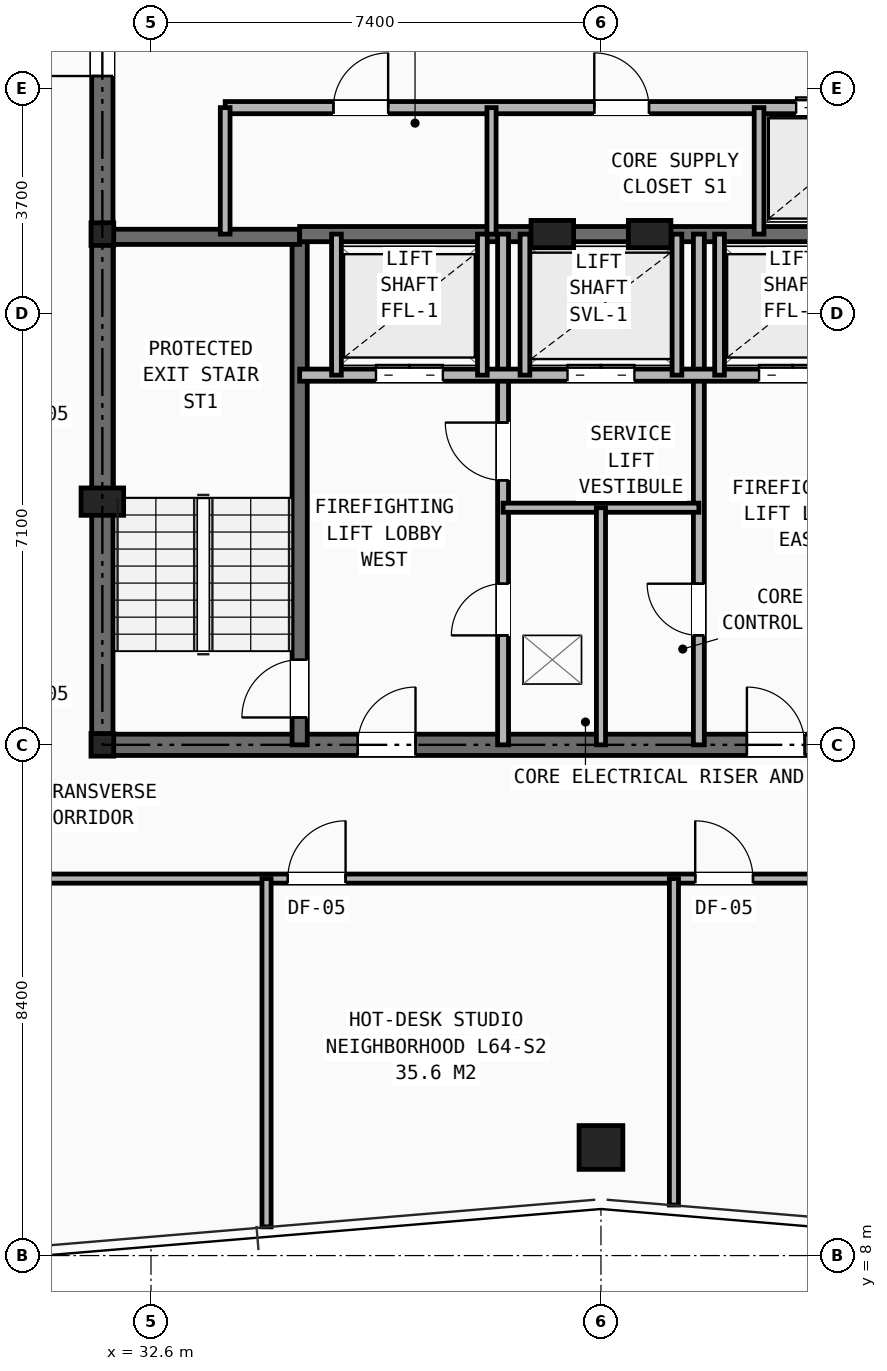
"""IFC4 building model, lengths in metres.
Left out: names, types, materials, properties, quantities, classifications, styles, units other than length and angle.
Written with IfcOpenShell. Run it as: python <this file> out.ifc"""

import sys

from ifc_helpers import new_model, si_unit, direction, frame, frame_2d, origin, origin_2d, place, context, subcontext, project, spatial, rectangle, hollow_rectangle, i_section, extrude, element, fill, save


model = new_model("IFC4")
c1 = context("Model", 3, precision=1e-05, world=origin(), true_north=direction((0.0, 1.0)))
c2 = subcontext(c1, "Body", "Model", "MODEL_VIEW")
j1 = project(units=[si_unit("LENGTHUNIT", "METRE"), si_unit("PLANEANGLEUNIT", "RADIAN")], contexts=[c1])
p1 = place(None, origin())
s1 = spatial("IfcSite", under=j1, at=p1, CompositionType="ELEMENT")
p2 = place(p1, origin())
s2 = spatial("IfcBuilding", under=s1, at=p2, CompositionType="ELEMENT")
p3 = place(p2, frame((0.0, 0.0, 225.9)))
s3 = spatial("IfcBuildingStorey", under=s2, at=p3, CompositionType="ELEMENT", Elevation=225.9)
for number, where, z_axis, x_axis in (
    (1, (31.8, 16.4, 0.0), (0.0, 0.0, 1.0), (1.0, 0.0, 0.0)),
    (2, (31.8, 24.8, 0.0), (0.0, 0.0, 1.0), (1.0, 0.0, 0.0)),
):
    element("IfcColumn", number, at=place(p3, frame(where, z_axis=z_axis, x_axis=x_axis)), inside=s3, PredefinedType="COLUMN", context=c2, shape_type="SweptSolid", body=[
        extrude(i_section(OverallWidth=0.374, OverallDepth=0.372, WebThickness=0.016, FlangeThickness=0.026, at=origin_2d()), origin(), (0.0, 0.0, 1.0), 3.5),
    ])
for number, where, z_axis, x_axis in (
    (3, (31.8, 20.4, 0.0), (0.0, 0.0, 1.0), (1.0, 0.0, 0.0)),
    (4, (39.2, 24.8, 0.0), (0.0, 0.0, 1.0), (1.0, 0.0, 0.0)),
    (5, (40.8, 24.8, 0.0), (0.0, 0.0, 1.0), (1.0, 0.0, 0.0)),
):
    element("IfcColumn", number, at=place(p3, frame(where, z_axis=z_axis, x_axis=x_axis)), inside=s3, PredefinedType="PILASTER", context=c2, shape_type="SweptSolid", body=[
        extrude(rectangle(XDim=0.7, YDim=0.45, at=origin_2d()), origin(), (0.0, 0.0, 1.0), 3.5),
    ])
p4 = place(p3, frame((40.0, 9.778, 0.0), z_axis=(0.0, 0.0, 1.0), x_axis=(1.0, 0.0, 0.0)))
e6 = element("IfcColumn", 6, at=p4, inside=s3, PredefinedType="COLUMN", context=c2, shape_type="SweptSolid", body=[
    extrude(hollow_rectangle(XDim=0.72, YDim=0.72, WallThickness=0.05, at=origin_2d()), origin(), (0.0, 0.0, 1.0), 3.5),
])
p5 = place(p3, frame((31.8, 16.4, 0.0), z_axis=(0.0, 0.0, 1.0), x_axis=(1.0, 0.0, 0.0)))
e7 = element("IfcWall", 7, at=p5, inside=s3, PredefinedType="SHEAR", context=c2, shape_type="SweptSolid", body=[
    extrude(rectangle(XDim=16.4, YDim=0.35, at=frame_2d((8.2, 0.0))), origin(), (0.0, 0.0, 1.0), 3.25),
])
p6 = place(p5, frame((4.2, 0.0, 0.0)))
e8 = element("IfcOpeningElement", 8, at=p6, cuts=e7, PredefinedType="OPENING", context=c2, shape_type="SweptSolid", body=[
    extrude(rectangle(XDim=0.95, YDim=2.1, at=frame_2d((0.475, 1.05))), frame((0.0, 0.185, 0.0), z_axis=(0.0, -1.0, 0.0), x_axis=(1.0, 0.0, 0.0)), (0.0, 0.0, 1.0), 0.37),
])
p7 = place(p5, frame((10.6, 0.0, 0.0)))
e9 = element("IfcOpeningElement", 9, at=p7, cuts=e7, PredefinedType="OPENING", context=c2, shape_type="SweptSolid", body=[
    extrude(rectangle(XDim=0.95, YDim=2.1, at=frame_2d((0.475, 1.05))), frame((0.0, 0.185, 0.0), z_axis=(0.0, -1.0, 0.0), x_axis=(1.0, 0.0, 0.0)), (0.0, 0.0, 1.0), 0.37),
])
p8 = place(p3, frame((31.8, 16.4, 0.0), z_axis=(0.0, 0.0, 1.0), x_axis=(0.0, 1.0, 0.0)))
e10 = element("IfcWall", 10, at=p8, inside=s3, PredefinedType="SHEAR", context=c2, shape_type="SweptSolid", body=[
    extrude(rectangle(XDim=14.8, YDim=0.35, at=frame_2d((7.4, 0.0))), origin(), (0.0, 0.0, 1.0), 3.25),
])
p9 = place(p8, frame((11.0, 0.0, 0.0)))
e11 = element("IfcOpeningElement", 11, at=p9, cuts=e10, PredefinedType="OPENING", context=c2, shape_type="SweptSolid", body=[
    extrude(rectangle(XDim=1.1, YDim=2.15, at=frame_2d((0.55, 1.075))), frame((0.0, 0.185, 0.0), z_axis=(0.0, -1.0, 0.0), x_axis=(1.0, 0.0, 0.0)), (0.0, 0.0, 1.0), 0.37),
])
p10 = place(p3, frame((35.045, 16.4, 0.0), z_axis=(0.0, 0.0, 1.0), x_axis=(0.0, 1.0, 0.0)))
e12 = element("IfcWall", 12, at=p10, inside=s3, PredefinedType="SHEAR", context=c2, shape_type="SweptSolid", body=[
    extrude(rectangle(XDim=8.4, YDim=0.25, at=frame_2d((4.2, 0.0))), origin(), (0.0, 0.0, 1.0), 3.25),
])
p11 = place(p10, frame((0.45, 0.0, 0.0)))
e13 = element("IfcOpeningElement", 13, at=p11, cuts=e12, PredefinedType="OPENING", context=c2, shape_type="SweptSolid", body=[
    extrude(rectangle(XDim=0.95, YDim=2.1, at=frame_2d((0.475, 1.05))), frame((0.0, 0.135, 0.0), z_axis=(0.0, -1.0, 0.0), x_axis=(1.0, 0.0, 0.0)), (0.0, 0.0, 1.0), 0.27),
])
p12 = place(p3, frame((31.8, 24.755, 0.0), z_axis=(0.0, 0.0, 1.0), x_axis=(1.0, 0.0, 0.0)))
e14 = element("IfcWall", 14, at=p12, inside=s3, PredefinedType="SHEAR", context=c2, shape_type="SweptSolid", body=[
    extrude(rectangle(XDim=3.245, YDim=0.25, at=frame_2d((1.623, 0.0))), origin(), (0.0, 0.0, 1.0), 3.25),
])
p13 = place(p3, frame((35.045, 24.8, 0.0), z_axis=(0.0, 0.0, 1.0), x_axis=(1.0, 0.0, 0.0)))
e15 = element("IfcWall", 15, at=p13, inside=s3, PredefinedType="SHEAR", context=c2, shape_type="SweptSolid", body=[
    extrude(rectangle(XDim=9.91, YDim=0.25, at=frame_2d((4.955, 0.0))), origin(), (0.0, 0.0, 1.0), 3.25),
])
p14 = place(p3, frame((38.39, 16.4, 0.0), z_axis=(0.0, 0.0, 1.0), x_axis=(0.0, 1.0, 0.0)))
e16 = element("IfcWall", 16, at=p14, inside=s3, PredefinedType="PARTITIONING", context=c2, shape_type="SweptSolid", body=[
    extrude(rectangle(XDim=8.4, YDim=0.18, at=frame_2d((4.2, 0.0))), origin(), (0.0, 0.0, 1.0), 2.705),
])
p15 = place(p14, frame((1.8, 0.0, 0.0)))
e17 = element("IfcOpeningElement", 17, at=p15, cuts=e16, PredefinedType="OPENING", context=c2, shape_type="SweptSolid", body=[
    extrude(rectangle(XDim=0.85, YDim=2.05, at=frame_2d((0.425, 1.025))), frame((0.0, 0.1, 0.0), z_axis=(0.0, -1.0, 0.0), x_axis=(1.0, 0.0, 0.0)), (0.0, 0.0, 1.0), 0.2),
])
p16 = place(p14, frame((4.35, 0.0, 0.0)))
e18 = element("IfcOpeningElement", 18, at=p16, cuts=e16, PredefinedType="OPENING", context=c2, shape_type="SweptSolid", body=[
    extrude(rectangle(XDim=0.95, YDim=2.1, at=frame_2d((0.475, 1.05))), frame((0.0, 0.1, 0.0), z_axis=(0.0, -1.0, 0.0), x_axis=(1.0, 0.0, 0.0)), (0.0, 0.0, 1.0), 0.2),
])
p17 = place(p3, frame((41.61, 16.4, 0.0), z_axis=(0.0, 0.0, 1.0), x_axis=(0.0, 1.0, 0.0)))
e19 = element("IfcWall", 19, at=p17, inside=s3, PredefinedType="PARTITIONING", context=c2, shape_type="SweptSolid", body=[
    extrude(rectangle(XDim=8.4, YDim=0.18, at=frame_2d((4.2, 0.0))), origin(), (0.0, 0.0, 1.0), 2.705),
])
p18 = place(p17, frame((1.8, 0.0, 0.0)))
e20 = element("IfcOpeningElement", 20, at=p18, cuts=e19, PredefinedType="OPENING", context=c2, shape_type="SweptSolid", body=[
    extrude(rectangle(XDim=0.85, YDim=2.05, at=frame_2d((0.425, 1.025))), frame((0.0, 0.1, 0.0), z_axis=(0.0, -1.0, 0.0), x_axis=(1.0, 0.0, 0.0)), (0.0, 0.0, 1.0), 0.2),
])
p19 = place(p3, frame((35.045, 22.48, 0.0), z_axis=(0.0, 0.0, 1.0), x_axis=(1.0, 0.0, 0.0)))
e21 = element("IfcWall", 21, at=p19, inside=s3, PredefinedType="SOLIDWALL", context=c2, shape_type="SweptSolid", body=[
    extrude(rectangle(XDim=9.91, YDim=0.2, at=frame_2d((4.955, 0.0))), origin(), (0.0, 0.0, 1.0), 3.25),
])
p20 = place(p19, frame((1.255, 0.0, 0.0)))
e22 = element("IfcOpeningElement", 22, at=p20, cuts=e21, PredefinedType="OPENING", context=c2, shape_type="SweptSolid", body=[
    extrude(rectangle(XDim=1.1, YDim=2.15, at=frame_2d((0.55, 1.075))), frame((0.0, 0.11, 0.0), z_axis=(0.0, -1.0, 0.0), x_axis=(1.0, 0.0, 0.0)), (0.0, 0.0, 1.0), 0.22),
])
p21 = place(p19, frame((7.555, 0.0, 0.0)))
e23 = element("IfcOpeningElement", 23, at=p21, cuts=e21, PredefinedType="OPENING", context=c2, shape_type="SweptSolid", body=[
    extrude(rectangle(XDim=1.1, YDim=2.15, at=frame_2d((0.55, 1.075))), frame((0.0, 0.11, 0.0), z_axis=(0.0, -1.0, 0.0), x_axis=(1.0, 0.0, 0.0)), (0.0, 0.0, 1.0), 0.22),
])
p22 = place(p19, frame((4.405, 0.0, 0.0)))
e24 = element("IfcOpeningElement", 24, at=p22, cuts=e21, PredefinedType="OPENING", context=c2, shape_type="SweptSolid", body=[
    extrude(rectangle(XDim=1.1, YDim=2.15, at=frame_2d((0.55, 1.075))), frame((0.0, 0.11, 0.0), z_axis=(0.0, -1.0, 0.0), x_axis=(1.0, 0.0, 0.0)), (0.0, 0.0, 1.0), 0.22),
])
p23 = place(p3, frame((38.39, 20.3, 0.0), z_axis=(0.0, 0.0, 1.0), x_axis=(1.0, 0.0, 0.0)))
e25 = element("IfcWall", 25, at=p23, inside=s3, PredefinedType="PARTITIONING", context=c2, shape_type="SweptSolid", body=[
    extrude(rectangle(XDim=3.22, YDim=0.15, at=frame_2d((1.61, 0.0))), origin(), (0.0, 0.0, 1.0), 3.25),
])
p24 = place(p3, frame((40.0, 16.4, 0.0), z_axis=(0.0, 0.0, 1.0), x_axis=(0.0, 1.0, 0.0)))
e26 = element("IfcWall", 26, at=p24, inside=s3, PredefinedType="PARTITIONING", context=c2, shape_type="SweptSolid", body=[
    extrude(rectangle(XDim=3.9, YDim=0.15, at=frame_2d((1.95, 0.0))), origin(), (0.0, 0.0, 1.0), 2.705),
])
for number, where, z_axis, x_axis in (
    (27, (35.65, 22.48, 0.0), (0.0, 0.0, 1.0), (0.0, 1.0, 0.0)),
    (28, (38.05, 22.48, 0.0), (0.0, 0.0, 1.0), (0.0, 1.0, 0.0)),
    (29, (41.95, 22.48, 0.0), (0.0, 0.0, 1.0), (0.0, 1.0, 0.0)),
    (30, (38.75, 22.48, 0.0), (0.0, 0.0, 1.0), (0.0, 1.0, 0.0)),
    (31, (41.25, 22.48, 0.0), (0.0, 0.0, 1.0), (0.0, 1.0, 0.0)),
):
    element("IfcWall", number, at=place(p3, frame(where, z_axis=z_axis, x_axis=x_axis)), inside=s3, PredefinedType="SOLIDWALL", context=c2, shape_type="SweptSolid", body=[
        extrude(rectangle(XDim=2.32, YDim=0.16, at=frame_2d((1.16, 0.0))), origin(), (0.0, 0.0, 1.0), 3.25),
    ])
p25 = place(p3, frame((33.82, 26.88, 0.0), z_axis=(0.0, 0.0, 1.0), x_axis=(1.0, 0.0, 0.0)))
e32 = element("IfcWall", 32, at=p25, inside=s3, PredefinedType="SOLIDWALL", context=c2, shape_type="SweptSolid", body=[
    extrude(rectangle(XDim=14.38, YDim=0.2, at=frame_2d((7.19, 0.0))), origin(), (0.0, 0.0, 1.0), 2.705),
])
p26 = place(p25, frame((1.78, 0.0, 0.0)))
e33 = element("IfcOpeningElement", 33, at=p26, cuts=e32, PredefinedType="OPENING", context=c2, shape_type="SweptSolid", body=[
    extrude(rectangle(XDim=0.9, YDim=2.1, at=frame_2d((0.45, 1.05))), frame((0.0, 0.11, 0.0), z_axis=(0.0, -1.0, 0.0), x_axis=(1.0, 0.0, 0.0)), (0.0, 0.0, 1.0), 0.22),
])
p27 = place(p25, frame((6.07, 0.0, 0.0)))
e34 = element("IfcOpeningElement", 34, at=p27, cuts=e32, PredefinedType="OPENING", context=c2, shape_type="SweptSolid", body=[
    extrude(rectangle(XDim=0.9, YDim=2.1, at=frame_2d((0.45, 1.05))), frame((0.0, 0.11, 0.0), z_axis=(0.0, -1.0, 0.0), x_axis=(1.0, 0.0, 0.0)), (0.0, 0.0, 1.0), 0.22),
])
p28 = place(p25, frame((9.39, 0.0, 0.0)))
e35 = element("IfcOpeningElement", 35, at=p28, cuts=e32, PredefinedType="OPENING", context=c2, shape_type="SweptSolid", body=[
    extrude(rectangle(XDim=1.1, YDim=2.15, at=frame_2d((0.55, 1.075))), frame((0.0, 0.11, 0.0), z_axis=(0.0, -1.0, 0.0), x_axis=(1.0, 0.0, 0.0)), (0.0, 0.0, 1.0), 0.22),
])
p29 = place(p25, frame((11.71, 0.0, 0.0)))
e36 = element("IfcOpeningElement", 36, at=p29, cuts=e32, PredefinedType="OPENING", context=c2, shape_type="SweptSolid", body=[
    extrude(rectangle(XDim=1.1, YDim=2.15, at=frame_2d((0.55, 1.075))), frame((0.0, 0.11, 0.0), z_axis=(0.0, -1.0, 0.0), x_axis=(1.0, 0.0, 0.0)), (0.0, 0.0, 1.0), 0.22),
])
p30 = place(p3, frame((33.82, 24.8, 0.0), z_axis=(0.0, 0.0, 1.0), x_axis=(0.0, 1.0, 0.0)))
e37 = element("IfcWall", 37, at=p30, inside=s3, PredefinedType="SOLIDWALL", context=c2, shape_type="SweptSolid", body=[
    extrude(rectangle(XDim=2.08, YDim=0.16, at=frame_2d((1.04, 0.0))), origin(), (0.0, 0.0, 1.0), 3.25),
])
p31 = place(p3, frame((38.2, 24.8, 0.0), z_axis=(0.0, 0.0, 1.0), x_axis=(0.0, 1.0, 0.0)))
e38 = element("IfcWall", 38, at=p31, inside=s3, PredefinedType="PARTITIONING", context=c2, shape_type="SweptSolid", body=[
    extrude(rectangle(XDim=2.08, YDim=0.15, at=frame_2d((1.04, 0.0))), origin(), (0.0, 0.0, 1.0), 3.25),
])
p32 = place(p3, frame((42.6, 24.8, 0.0), z_axis=(0.0, 0.0, 1.0), x_axis=(0.0, 1.0, 0.0)))
e39 = element("IfcWall", 39, at=p32, inside=s3, PredefinedType="SOLIDWALL", context=c2, shape_type="SweptSolid", body=[
    extrude(rectangle(XDim=2.08, YDim=0.16, at=frame_2d((1.04, 0.0))), origin(), (0.0, 0.0, 1.0), 3.25),
])
p33 = place(p3, frame((25.5, 14.2, 0.0), z_axis=(0.0, 0.0, 1.0), x_axis=(1.0, 0.0, 0.0)))
e40 = element("IfcWall", 40, at=p33, inside=s3, PredefinedType="PARTITIONING", context=c2, shape_type="SweptSolid", body=[
    extrude(rectangle(XDim=29.0, YDim=0.15, at=frame_2d((14.5, 0.0))), origin(), (0.0, 0.0, 1.0), 2.292),
])
p34 = place(p33, frame((0.85, 0.0, 0.0)))
e41 = element("IfcOpeningElement", 41, at=p34, cuts=e40, PredefinedType="OPENING", context=c2, shape_type="SweptSolid", body=[
    extrude(rectangle(XDim=0.95, YDim=2.1, at=frame_2d((0.475, 1.05))), frame((0.0, 0.085, 0.0), z_axis=(0.0, -1.0, 0.0), x_axis=(1.0, 0.0, 0.0)), (0.0, 0.0, 1.0), 0.17),
])
p35 = place(p33, frame((9.35, 0.0, 0.0)))
e42 = element("IfcOpeningElement", 42, at=p35, cuts=e40, PredefinedType="OPENING", context=c2, shape_type="SweptSolid", body=[
    extrude(rectangle(XDim=0.95, YDim=2.1, at=frame_2d((0.475, 1.05))), frame((0.0, 0.085, 0.0), z_axis=(0.0, -1.0, 0.0), x_axis=(1.0, 0.0, 0.0)), (0.0, 0.0, 1.0), 0.17),
])
p36 = place(p33, frame((16.05, 0.0, 0.0)))
e43 = element("IfcOpeningElement", 43, at=p36, cuts=e40, PredefinedType="OPENING", context=c2, shape_type="SweptSolid", body=[
    extrude(rectangle(XDim=0.95, YDim=2.1, at=frame_2d((0.475, 1.05))), frame((0.0, 0.085, 0.0), z_axis=(0.0, -1.0, 0.0), x_axis=(1.0, 0.0, 0.0)), (0.0, 0.0, 1.0), 0.17),
])
p37 = place(p3, frame((34.5, 8.472, 0.0), z_axis=(0.0, 0.0, 1.0), x_axis=(0.0, 1.0, 0.0)))
e44 = element("IfcWall", 44, at=p37, inside=s3, PredefinedType="PARTITIONING", context=c2, shape_type="SweptSolid", body=[
    extrude(rectangle(XDim=5.728, YDim=0.15, at=frame_2d((2.864, 0.0))), origin(), (0.0, 0.0, 1.0), 2.292),
])
p38 = place(p3, frame((41.2, 8.831, 0.0), z_axis=(0.0, 0.0, 1.0), x_axis=(0.0, 1.0, 0.0)))
e45 = element("IfcWall", 45, at=p38, inside=s3, PredefinedType="PARTITIONING", context=c2, shape_type="SweptSolid", body=[
    extrude(rectangle(XDim=5.369, YDim=0.15, at=frame_2d((2.684, 0.0))), origin(), (0.0, 0.0, 1.0), 2.628),
])
p39 = place(p15, origin())
e46 = element("IfcDoor", 46, at=p39, inside=s3, OperationType="SINGLE_SWING_LEFT", PredefinedType="DOOR", context=c2, shape_type="SweptSolid", body=[
    extrude(rectangle(XDim=0.85, YDim=2.05, at=frame_2d((0.425, 1.025))), frame((0.0, 0.025, 0.0), z_axis=(0.0, -1.0, 0.0), x_axis=(1.0, 0.0, 0.0)), (0.0, 0.0, 1.0), 0.05),
])
fill(e17, e46)
p40 = place(p18, origin())
e47 = element("IfcDoor", 47, at=p40, inside=s3, OperationType="SINGLE_SWING_RIGHT", PredefinedType="DOOR", context=c2, shape_type="SweptSolid", body=[
    extrude(rectangle(XDim=0.85, YDim=2.05, at=frame_2d((0.425, 1.025))), frame((0.0, 0.025, 0.0), z_axis=(0.0, -1.0, 0.0), x_axis=(1.0, 0.0, 0.0)), (0.0, 0.0, 1.0), 0.05),
])
fill(e20, e47)
p41 = place(p16, origin())
e48 = element("IfcDoor", 48, at=p41, inside=s3, OperationType="SINGLE_SWING_RIGHT", PredefinedType="DOOR", context=c2, shape_type="SweptSolid", body=[
    extrude(rectangle(XDim=0.95, YDim=2.1, at=frame_2d((0.475, 1.05))), frame((0.0, 0.025, 0.0), z_axis=(0.0, -1.0, 0.0), x_axis=(1.0, 0.0, 0.0)), (0.0, 0.0, 1.0), 0.05),
])
fill(e18, e48)
p42 = place(p11, origin())
e49 = element("IfcDoor", 49, at=p42, inside=s3, OperationType="SINGLE_SWING_LEFT", PredefinedType="DOOR", context=c2, shape_type="SweptSolid", body=[
    extrude(rectangle(XDim=0.95, YDim=2.1, at=frame_2d((0.475, 1.05))), frame((0.0, 0.025, 0.0), z_axis=(0.0, -1.0, 0.0), x_axis=(1.0, 0.0, 0.0)), (0.0, 0.0, 1.0), 0.05),
])
fill(e13, e49)
p43 = place(p6, origin())
e50 = element("IfcDoor", 50, at=p43, inside=s3, OperationType="SINGLE_SWING_RIGHT", PredefinedType="DOOR", context=c2, shape_type="SweptSolid", body=[
    extrude(rectangle(XDim=0.95, YDim=2.1, at=frame_2d((0.475, 1.05))), frame((0.0, 0.025, 0.0), z_axis=(0.0, -1.0, 0.0), x_axis=(1.0, 0.0, 0.0)), (0.0, 0.0, 1.0), 0.05),
])
fill(e8, e50)
p44 = place(p7, origin())
e51 = element("IfcDoor", 51, at=p44, inside=s3, OperationType="SINGLE_SWING_LEFT", PredefinedType="DOOR", context=c2, shape_type="SweptSolid", body=[
    extrude(rectangle(XDim=0.95, YDim=2.1, at=frame_2d((0.475, 1.05))), frame((0.0, 0.025, 0.0), z_axis=(0.0, -1.0, 0.0), x_axis=(1.0, 0.0, 0.0)), (0.0, 0.0, 1.0), 0.05),
])
fill(e9, e51)
p45 = place(p20, origin())
e52 = element("IfcDoor", 52, at=p45, inside=s3, OperationType="DOUBLE_DOOR_SLIDING", PredefinedType="DOOR", context=c2, shape_type="SweptSolid", body=[
    extrude(rectangle(XDim=1.1, YDim=2.15, at=frame_2d((0.55, 1.075))), frame((0.0, 0.025, 0.0), z_axis=(0.0, -1.0, 0.0), x_axis=(1.0, 0.0, 0.0)), (0.0, 0.0, 1.0), 0.05),
])
fill(e22, e52)
p46 = place(p21, origin())
e53 = element("IfcDoor", 53, at=p46, inside=s3, OperationType="DOUBLE_DOOR_SLIDING", PredefinedType="DOOR", context=c2, shape_type="SweptSolid", body=[
    extrude(rectangle(XDim=1.1, YDim=2.15, at=frame_2d((0.55, 1.075))), frame((0.0, 0.025, 0.0), z_axis=(0.0, -1.0, 0.0), x_axis=(1.0, 0.0, 0.0)), (0.0, 0.0, 1.0), 0.05),
])
fill(e23, e53)
p47 = place(p22, origin())
e54 = element("IfcDoor", 54, at=p47, inside=s3, OperationType="DOUBLE_DOOR_SLIDING", PredefinedType="DOOR", context=c2, shape_type="SweptSolid", body=[
    extrude(rectangle(XDim=1.1, YDim=2.15, at=frame_2d((0.55, 1.075))), frame((0.0, 0.025, 0.0), z_axis=(0.0, -1.0, 0.0), x_axis=(1.0, 0.0, 0.0)), (0.0, 0.0, 1.0), 0.05),
])
fill(e24, e54)
p48 = place(p9, origin())
e55 = element("IfcDoor", 55, at=p48, inside=s3, OperationType="SINGLE_SWING_LEFT", PredefinedType="DOOR", context=c2, shape_type="SweptSolid", body=[
    extrude(rectangle(XDim=1.1, YDim=2.15, at=frame_2d((0.55, 1.075))), frame((0.0, 0.025, 0.0), z_axis=(0.0, -1.0, 0.0), x_axis=(1.0, 0.0, 0.0)), (0.0, 0.0, 1.0), 0.05),
])
fill(e11, e55)
p49 = place(p26, origin())
e56 = element("IfcDoor", 56, at=p49, inside=s3, OperationType="SINGLE_SWING_RIGHT", PredefinedType="DOOR", context=c2, shape_type="SweptSolid", body=[
    extrude(rectangle(XDim=0.9, YDim=2.1, at=frame_2d((0.45, 1.05))), frame((0.0, 0.025, 0.0), z_axis=(0.0, -1.0, 0.0), x_axis=(1.0, 0.0, 0.0)), (0.0, 0.0, 1.0), 0.05),
])
fill(e33, e56)
p50 = place(p27, origin())
e57 = element("IfcDoor", 57, at=p50, inside=s3, OperationType="SINGLE_SWING_LEFT", PredefinedType="DOOR", context=c2, shape_type="SweptSolid", body=[
    extrude(rectangle(XDim=0.9, YDim=2.1, at=frame_2d((0.45, 1.05))), frame((0.0, 0.025, 0.0), z_axis=(0.0, -1.0, 0.0), x_axis=(1.0, 0.0, 0.0)), (0.0, 0.0, 1.0), 0.05),
])
fill(e34, e57)
p51 = place(p28, origin())
e58 = element("IfcDoor", 58, at=p51, inside=s3, OperationType="DOUBLE_DOOR_SLIDING", PredefinedType="DOOR", context=c2, shape_type="SweptSolid", body=[
    extrude(rectangle(XDim=1.1, YDim=2.15, at=frame_2d((0.55, 1.075))), frame((0.0, 0.025, 0.0), z_axis=(0.0, -1.0, 0.0), x_axis=(1.0, 0.0, 0.0)), (0.0, 0.0, 1.0), 0.05),
])
fill(e35, e58)
p52 = place(p35, origin())
e59 = element("IfcDoor", 59, at=p52, inside=s3, OperationType="SINGLE_SWING_RIGHT", PredefinedType="DOOR", context=c2, shape_type="SweptSolid", body=[
    extrude(rectangle(XDim=0.95, YDim=2.1, at=frame_2d((0.475, 1.05))), frame((0.0, 0.025, 0.0), z_axis=(0.0, -1.0, 0.0), x_axis=(1.0, 0.0, 0.0)), (0.0, 0.0, 1.0), 0.05),
])
fill(e42, e59)
p53 = place(p36, origin())
e60 = element("IfcDoor", 60, at=p53, inside=s3, OperationType="SINGLE_SWING_LEFT", PredefinedType="DOOR", context=c2, shape_type="SweptSolid", body=[
    extrude(rectangle(XDim=0.95, YDim=2.1, at=frame_2d((0.475, 1.05))), frame((0.0, 0.025, 0.0), z_axis=(0.0, -1.0, 0.0), x_axis=(1.0, 0.0, 0.0)), (0.0, 0.0, 1.0), 0.05),
])
fill(e43, e60)
save(model, sys.argv[1])
